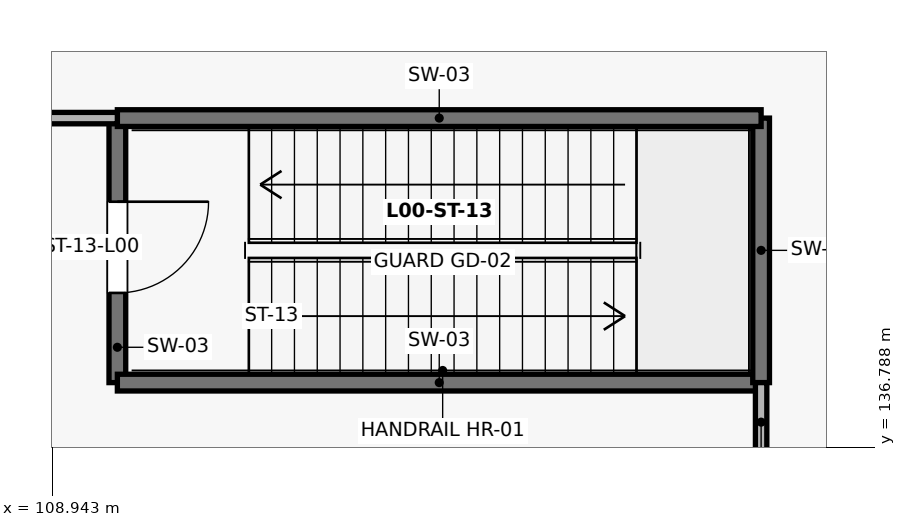
"""IFC4 building model, lengths in metres.
Left out: names, types, materials, properties, quantities, classifications, styles, units other than length and angle.
Written with IfcOpenShell. Run it as: python <this file> out.ifc"""

import sys

from ifc_helpers import new_model, si_unit, direction, frame, frame_2d, origin, place, context, subcontext, project, spatial, rectangle, extrude, element, fill, save


model = new_model("IFC4")
c1 = context("Model", 3, precision=1e-05, world=origin(), true_north=direction((0.0, 1.0)))
c2 = subcontext(c1, "Body", "Model", "MODEL_VIEW")
j1 = project(units=[si_unit("LENGTHUNIT", "METRE"), si_unit("PLANEANGLEUNIT", "RADIAN")], contexts=[c1])
p1 = place(None, origin())
s1 = spatial("IfcSite", under=j1, at=p1, CompositionType="ELEMENT")
p2 = place(p1, origin())
s2 = spatial("IfcBuilding", under=s1, at=p2, CompositionType="ELEMENT")
p3 = place(p2, origin())
s3 = spatial("IfcBuildingStorey", under=s2, at=p3, CompositionType="ELEMENT", Elevation=0.0)
p4 = place(p3, frame((109.8, 141.12, 0.0), z_axis=(0.0, 0.0, 1.0), x_axis=(0.0, -1.0, 0.0)))
e1 = element("IfcWall", 1, at=p4, inside=s3, PredefinedType="SHEAR", context=c2, shape_type="SweptSolid", body=[
    extrude(rectangle(XDim=3.48, YDim=0.22, at=frame_2d((1.74, 0.0))), origin(), (0.0, 0.0, 1.0), 6.28),
])
p5 = place(p4, frame((1.1, 0.0, 0.0)))
e2 = element("IfcOpeningElement", 2, at=p5, cuts=e1, PredefinedType="OPENING", context=c2, shape_type="SweptSolid", body=[
    extrude(rectangle(XDim=1.2, YDim=2.2, at=frame_2d((0.6, 1.1))), frame((0.0, 0.125, 0.0), z_axis=(0.0, -1.0, 0.0), x_axis=(1.0, 0.0, 0.0)), (0.0, 0.0, 1.0), 0.25),
])
p6 = place(p3, frame((109.8, 137.64, 0.0), z_axis=(0.0, 0.0, 1.0), x_axis=(1.0, 0.0, 0.0)))
e3 = element("IfcWall", 3, at=p6, inside=s3, PredefinedType="SHEAR", context=c2, shape_type="SweptSolid", body=[
    extrude(rectangle(XDim=8.47, YDim=0.22, at=frame_2d((4.235, 0.0))), origin(), (0.0, 0.0, 1.0), 6.28),
])
p7 = place(p3, frame((118.27, 137.64, 0.0), z_axis=(0.0, 0.0, 1.0), x_axis=(0.0, 1.0, 0.0)))
e4 = element("IfcWall", 4, at=p7, inside=s3, PredefinedType="SHEAR", context=c2, shape_type="SweptSolid", body=[
    extrude(rectangle(XDim=3.48, YDim=0.22, at=frame_2d((1.74, 0.0))), origin(), (0.0, 0.0, 1.0), 6.28),
])
p8 = place(p3, frame((118.27, 141.12, 0.0), z_axis=(0.0, 0.0, 1.0), x_axis=(-1.0, 0.0, 0.0)))
e5 = element("IfcWall", 5, at=p8, inside=s3, PredefinedType="SHEAR", context=c2, shape_type="SweptSolid", body=[
    extrude(rectangle(XDim=8.47, YDim=0.22, at=frame_2d((4.235, 0.0))), origin(), (0.0, 0.0, 1.0), 6.28),
])
p9 = place(p3, frame((106.4, 141.12, 0.0), z_axis=(0.0, 0.0, 1.0), x_axis=(1.0, 0.0, 0.0)))
e6 = element("IfcWall", 6, at=p9, inside=s3, PredefinedType="PARTITIONING", context=c2, shape_type="SweptSolid", body=[
    extrude(rectangle(XDim=3.4, YDim=0.15, at=frame_2d((1.7, 0.0))), origin(), (0.0, 0.0, 1.0), 5.413),
])
p10 = place(p3, frame((118.27, 136.6, 0.0), z_axis=(0.0, 0.0, 1.0), x_axis=(0.0, 1.0, 0.0)))
e7 = element("IfcWall", 7, at=p10, inside=s3, PredefinedType="PARTITIONING", context=c2, shape_type="SweptSolid", body=[
    extrude(rectangle(XDim=1.04, YDim=0.15, at=frame_2d((0.52, 0.0))), origin(), (0.0, 0.0, 1.0), 6.25),
])
p11 = place(p5, origin())
e8 = element("IfcDoor", 8, at=p11, inside=s3, OperationType="SINGLE_SWING_LEFT", PredefinedType="DOOR", context=c2, shape_type="SweptSolid", body=[
    extrude(rectangle(XDim=1.2, YDim=2.2, at=frame_2d((0.6, 1.1))), frame((0.0, 0.025, 0.0), z_axis=(0.0, -1.0, 0.0), x_axis=(1.0, 0.0, 0.0)), (0.0, 0.0, 1.0), 0.05),
])
fill(e2, e8)
save(model, sys.argv[1])
